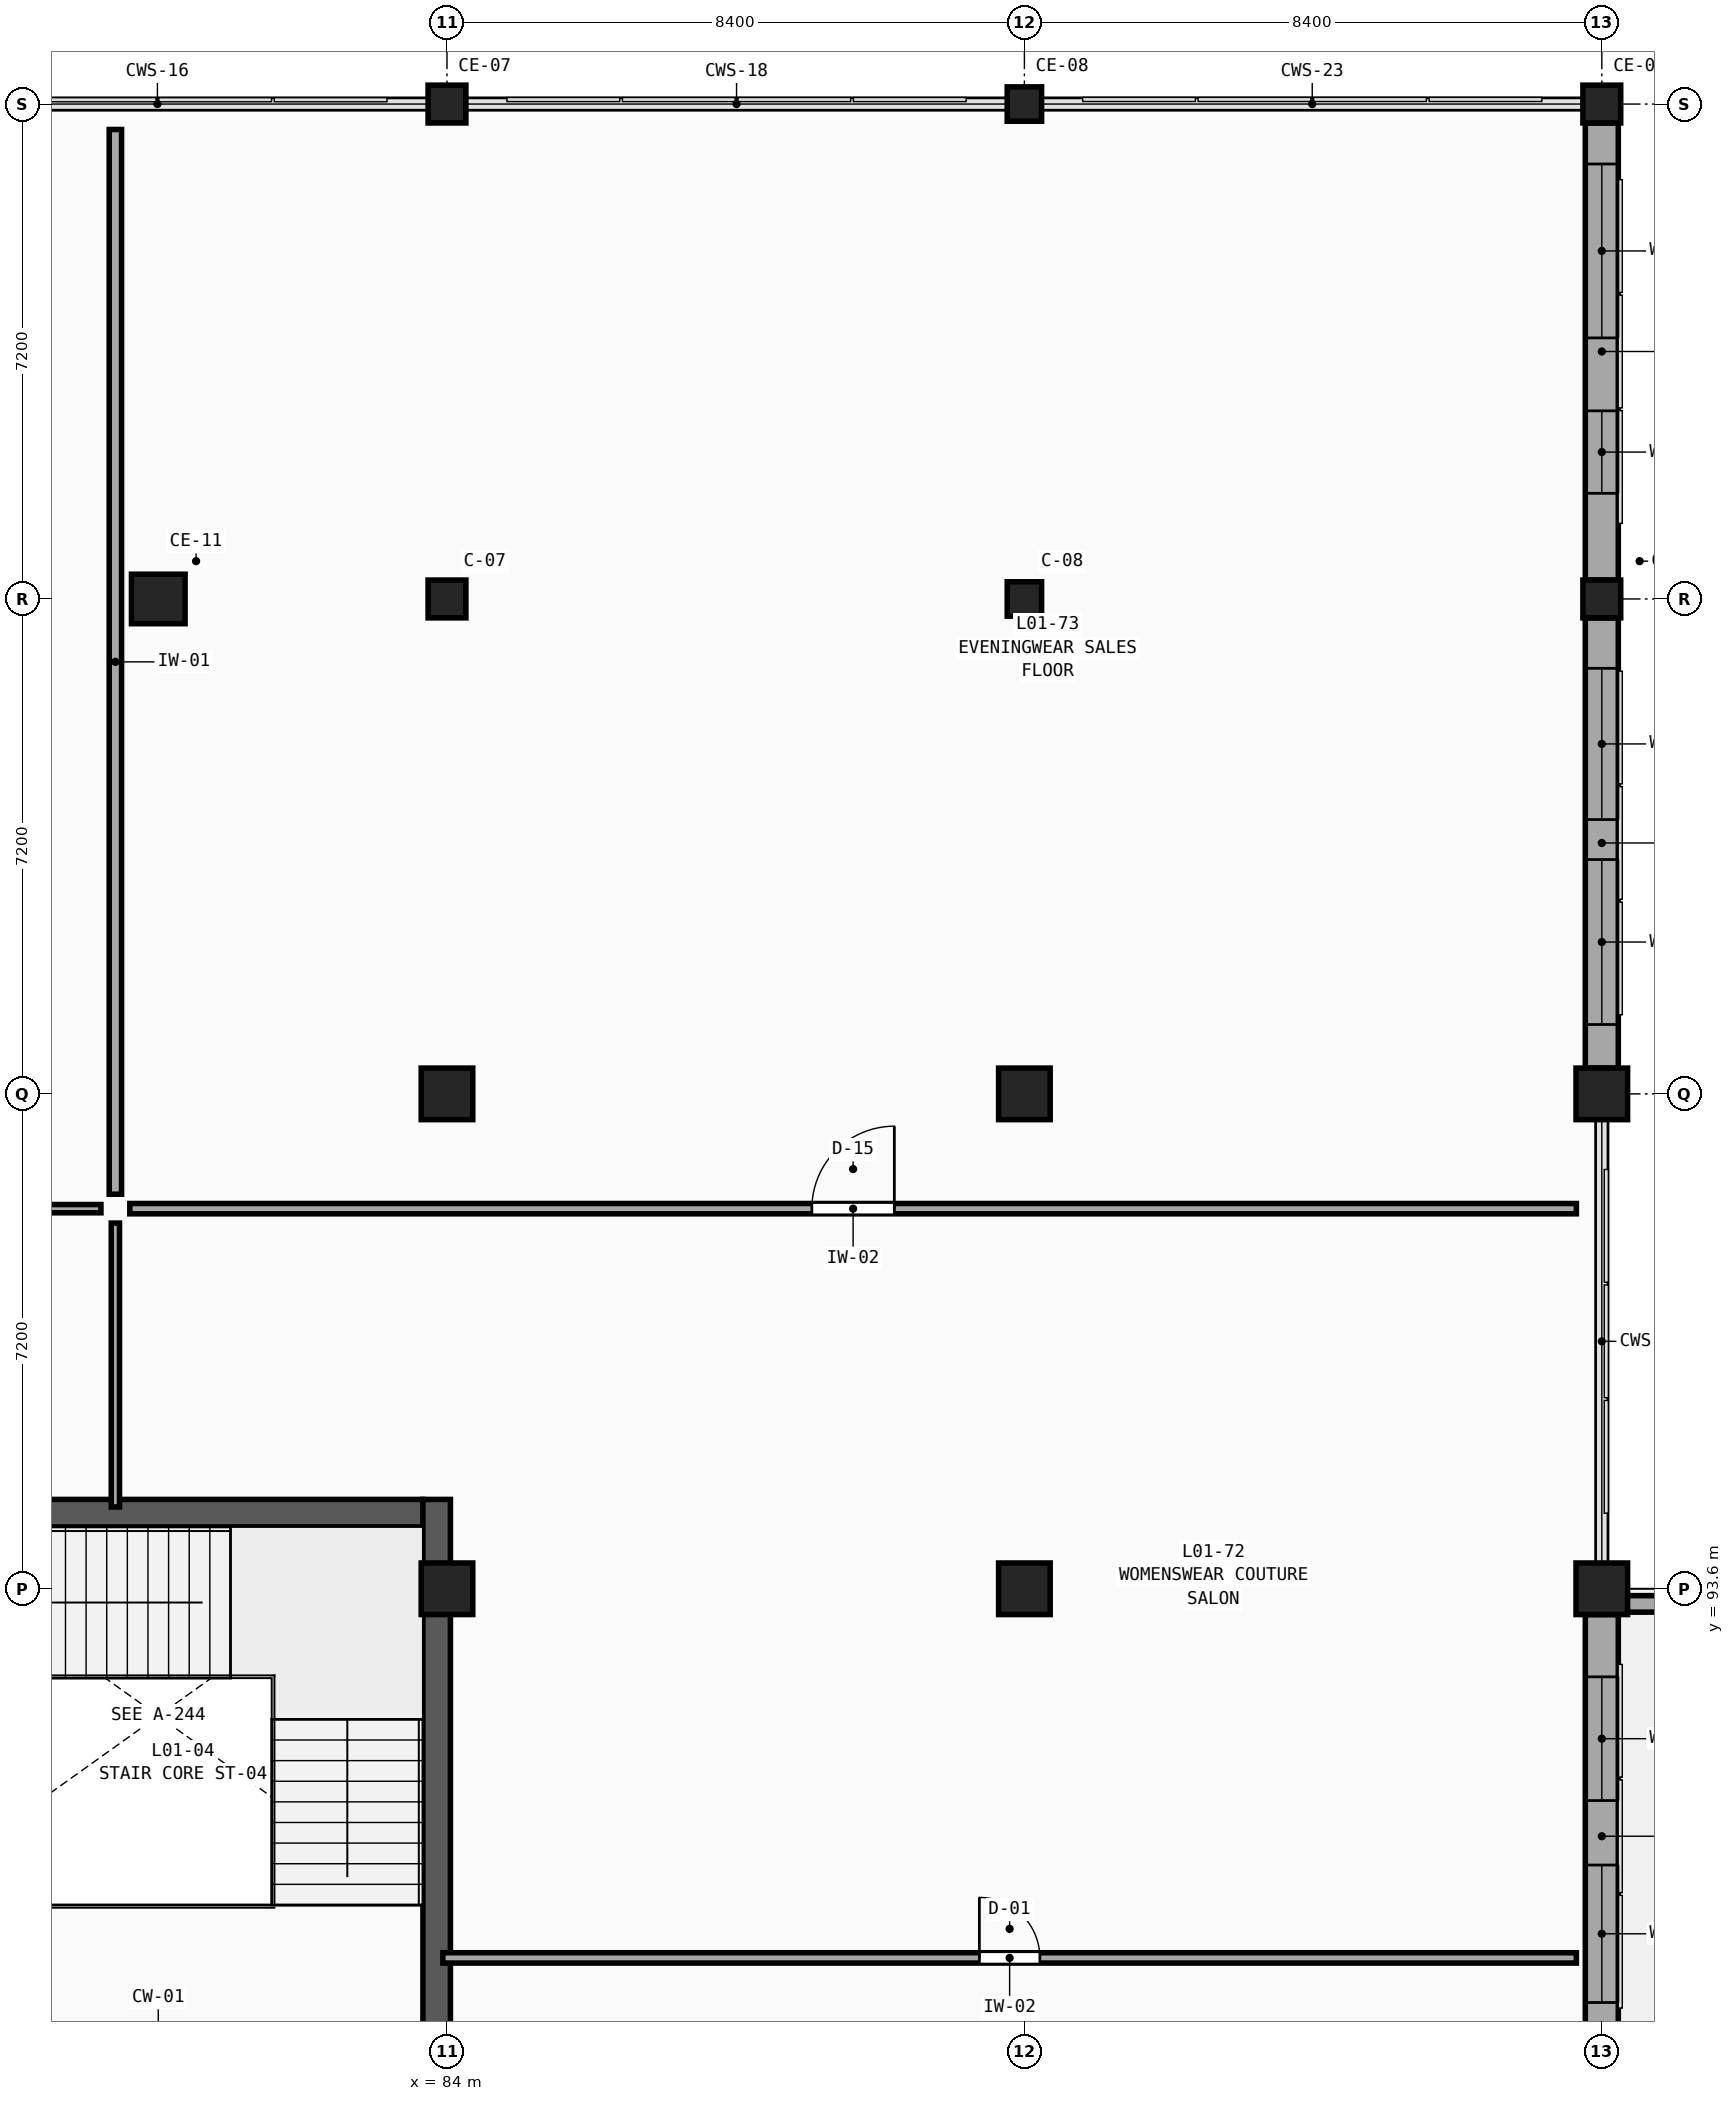
"""IFC4 building model, lengths in metres.
Left out: names, types, materials, properties, quantities, classifications, styles, units other than length and angle.
Written with IfcOpenShell. Run it as: python <this file> out.ifc"""

import sys

from ifc_helpers import new_model, si_unit, direction, frame, frame_2d, origin, origin_2d, place, context, subcontext, project, spatial, rectangle, extrude, element, fill, save


model = new_model("IFC4")
c1 = context("Model", 3, precision=1e-05, world=origin(), true_north=direction((0.0, 1.0)))
c2 = subcontext(c1, "Body", "Model", "MODEL_VIEW")
j1 = project(units=[si_unit("LENGTHUNIT", "METRE"), si_unit("PLANEANGLEUNIT", "RADIAN")], contexts=[c1])
p1 = place(None, origin())
s1 = spatial("IfcSite", under=j1, at=p1, CompositionType="ELEMENT")
p2 = place(p1, origin())
s2 = spatial("IfcBuilding", under=s1, at=p2, CompositionType="ELEMENT")
p3 = place(p2, frame((0.0, 0.0, 5.4)))
s3 = spatial("IfcBuildingStorey", under=s2, at=p3, CompositionType="ELEMENT", Elevation=5.4)
for number, where, z_axis, x_axis in (
    (1, (84.0, 93.6, 0.0), (0.0, 0.0, 1.0), (1.0, 0.0, 0.0)),
    (2, (84.0, 100.8, 0.0), (0.0, 0.0, 1.0), (1.0, 0.0, 0.0)),
):
    element("IfcColumn", number, at=place(p3, frame(where, z_axis=z_axis, x_axis=x_axis)), inside=s3, PredefinedType="COLUMN", context=c2, shape_type="SweptSolid", body=[
        extrude(rectangle(XDim=0.75, YDim=0.75, at=origin_2d()), origin(), (0.0, 0.0, 1.0), 4.5),
    ])
for number, where, z_axis, x_axis in (
    (3, (84.0, 108.0, 0.0), (0.0, 0.0, 1.0), (1.0, 0.0, 0.0)),
    (4, (84.0, 115.2, 0.0), (0.0, 0.0, 1.0), (1.0, 0.0, 0.0)),
):
    element("IfcColumn", number, at=place(p3, frame(where, z_axis=z_axis, x_axis=x_axis)), inside=s3, PredefinedType="COLUMN", context=c2, shape_type="SweptSolid", body=[
        extrude(rectangle(XDim=0.55, YDim=0.55, at=origin_2d()), origin(), (0.0, 0.0, 1.0), 4.5),
    ])
for number, where, z_axis, x_axis in (
    (5, (92.4, 93.6, 0.0), (0.0, 0.0, 1.0), (1.0, 0.0, 0.0)),
    (6, (92.4, 100.8, 0.0), (0.0, 0.0, 1.0), (1.0, 0.0, 0.0)),
):
    element("IfcColumn", number, at=place(p3, frame(where, z_axis=z_axis, x_axis=x_axis)), inside=s3, PredefinedType="COLUMN", context=c2, shape_type="SweptSolid", body=[
        extrude(rectangle(XDim=0.75, YDim=0.75, at=origin_2d()), origin(), (0.0, 0.0, 1.0), 4.5),
    ])
for number, where, z_axis, x_axis in (
    (7, (92.4, 108.0, 0.0), (0.0, 0.0, 1.0), (1.0, 0.0, 0.0)),
    (8, (92.4, 115.2, 0.0), (0.0, 0.0, 1.0), (1.0, 0.0, 0.0)),
):
    element("IfcColumn", number, at=place(p3, frame(where, z_axis=z_axis, x_axis=x_axis)), inside=s3, PredefinedType="COLUMN", context=c2, shape_type="SweptSolid", body=[
        extrude(rectangle(XDim=0.5, YDim=0.5, at=origin_2d()), origin(), (0.0, 0.0, 1.0), 4.5),
    ])
for number, where, z_axis, x_axis in (
    (9, (100.8, 93.6, 0.0), (0.0, 0.0, 1.0), (1.0, 0.0, 0.0)),
    (10, (100.8, 100.8, 0.0), (0.0, 0.0, 1.0), (1.0, 0.0, 0.0)),
):
    element("IfcColumn", number, at=place(p3, frame(where, z_axis=z_axis, x_axis=x_axis)), inside=s3, PredefinedType="COLUMN", context=c2, shape_type="SweptSolid", body=[
        extrude(rectangle(XDim=0.75, YDim=0.75, at=origin_2d()), origin(), (0.0, 0.0, 1.0), 4.5),
    ])
for number, where, z_axis, x_axis in (
    (11, (100.8, 108.0, 0.0), (0.0, 0.0, 1.0), (1.0, 0.0, 0.0)),
    (12, (100.8, 115.2, 0.0), (0.0, 0.0, 1.0), (1.0, 0.0, 0.0)),
):
    element("IfcColumn", number, at=place(p3, frame(where, z_axis=z_axis, x_axis=x_axis)), inside=s3, PredefinedType="COLUMN", context=c2, shape_type="SweptSolid", body=[
        extrude(rectangle(XDim=0.55, YDim=0.55, at=origin_2d()), origin(), (0.0, 0.0, 1.0), 4.5),
    ])
p4 = place(p3, frame((79.8, 108.0, 0.0), z_axis=(0.0, 0.0, 1.0), x_axis=(1.0, 0.0, 0.0)))
e13 = element("IfcColumn", 13, at=p4, inside=s3, PredefinedType="PILASTER", context=c2, shape_type="SweptSolid", body=[
    extrude(rectangle(XDim=0.78, YDim=0.72, at=origin_2d()), origin(), (0.0, 0.0, 1.0), 4.5),
])
p5 = place(p3, frame((100.8, 93.225, 0.0), z_axis=(0.0, 0.0, 1.0), x_axis=(0.0, -1.0, 0.0)))
e14 = element("IfcWall", 14, at=p5, inside=s3, PredefinedType="SOLIDWALL", context=c2, shape_type="SweptSolid", body=[
    extrude(rectangle(XDim=6.45, YDim=0.48, at=frame_2d((3.225, 0.0))), origin(), (0.0, 0.0, 1.0), 3.63),
])
p6 = place(p5, frame((0.906, 0.0, 0.75)))
e15 = element("IfcOpeningElement", 15, at=p6, cuts=e14, PredefinedType="OPENING", context=c2, shape_type="SweptSolid", body=[
    extrude(rectangle(XDim=1.8, YDim=2.73, at=frame_2d((0.9, 1.365))), frame((0.0, 0.26, 0.0), z_axis=(0.0, -1.0, 0.0), x_axis=(1.0, 0.0, 0.0)), (0.0, 0.0, 1.0), 0.52),
])
p7 = place(p5, frame((3.644, 0.0, 0.75)))
e16 = element("IfcOpeningElement", 16, at=p7, cuts=e14, PredefinedType="OPENING", context=c2, shape_type="SweptSolid", body=[
    extrude(rectangle(XDim=2.0, YDim=2.73, at=frame_2d((1.0, 1.365))), frame((0.0, 0.26, 0.0), z_axis=(0.0, -1.0, 0.0), x_axis=(1.0, 0.0, 0.0)), (0.0, 0.0, 1.0), 0.52),
])
p8 = place(p3, frame((100.8, 107.725, 0.0), z_axis=(0.0, 0.0, 1.0), x_axis=(0.0, -1.0, 0.0)))
e17 = element("IfcWall", 17, at=p8, inside=s3, PredefinedType="SOLIDWALL", context=c2, shape_type="SweptSolid", body=[
    extrude(rectangle(XDim=6.55, YDim=0.48, at=frame_2d((3.275, 0.0))), origin(), (0.0, 0.0, 1.0), 3.63),
])
p9 = place(p8, frame((0.734, 0.0, 0.75)))
e18 = element("IfcOpeningElement", 18, at=p9, cuts=e17, PredefinedType="OPENING", context=c2, shape_type="SweptSolid", body=[
    extrude(rectangle(XDim=2.2, YDim=2.73, at=frame_2d((1.1, 1.365))), frame((0.0, 0.26, 0.0), z_axis=(0.0, -1.0, 0.0), x_axis=(1.0, 0.0, 0.0)), (0.0, 0.0, 1.0), 0.52),
])
p10 = place(p8, frame((3.516, 0.0, 0.75)))
e19 = element("IfcOpeningElement", 19, at=p10, cuts=e17, PredefinedType="OPENING", context=c2, shape_type="SweptSolid", body=[
    extrude(rectangle(XDim=2.4, YDim=2.73, at=frame_2d((1.2, 1.365))), frame((0.0, 0.26, 0.0), z_axis=(0.0, -1.0, 0.0), x_axis=(1.0, 0.0, 0.0)), (0.0, 0.0, 1.0), 0.52),
])
p11 = place(p3, frame((100.8, 114.925, 0.0), z_axis=(0.0, 0.0, 1.0), x_axis=(0.0, -1.0, 0.0)))
e20 = element("IfcWall", 20, at=p11, inside=s3, PredefinedType="SOLIDWALL", context=c2, shape_type="SweptSolid", body=[
    extrude(rectangle(XDim=6.65, YDim=0.48, at=frame_2d((3.325, 0.0))), origin(), (0.0, 0.0, 1.0), 3.63),
])
p12 = place(p11, frame((0.597, 0.0, 0.75)))
e21 = element("IfcOpeningElement", 21, at=p12, cuts=e20, PredefinedType="OPENING", context=c2, shape_type="SweptSolid", body=[
    extrude(rectangle(XDim=2.53, YDim=2.73, at=frame_2d((1.265, 1.365))), frame((0.0, 0.26, 0.0), z_axis=(0.0, -1.0, 0.0), x_axis=(1.0, 0.0, 0.0)), (0.0, 0.0, 1.0), 0.52),
])
p13 = place(p11, frame((4.188, 0.0, 0.75)))
e22 = element("IfcOpeningElement", 22, at=p13, cuts=e20, PredefinedType="OPENING", context=c2, shape_type="SweptSolid", body=[
    extrude(rectangle(XDim=1.2, YDim=1.9, at=frame_2d((0.6, 0.95))), frame((0.0, 0.26, 0.0), z_axis=(0.0, -1.0, 0.0), x_axis=(1.0, 0.0, 0.0)), (0.0, 0.0, 1.0), 0.52),
])
p14 = place(p3, frame((101.15, 93.38, 0.0), z_axis=(0.0, 0.0, 1.0), x_axis=(1.0, 0.0, 0.0)))
e23 = element("IfcWall", 23, at=p14, inside=s3, PredefinedType="PARAPET", context=c2, shape_type="SweptSolid", body=[
    extrude(rectangle(XDim=16.1, YDim=0.24, at=frame_2d((8.05, 0.0))), origin(), (0.0, 0.0, 1.0), 1.15),
])
p15 = place(p3, frame((75.95, 94.7, 0.0), z_axis=(0.0, 0.0, 1.0), x_axis=(1.0, 0.0, 0.0)))
e24 = element("IfcWall", 24, at=p15, inside=s3, PredefinedType="SHEAR", context=c2, shape_type="SweptSolid", body=[
    extrude(rectangle(XDim=7.7, YDim=0.4, at=frame_2d((3.85, 0.0))), origin(), (0.0, 0.0, 1.0), 4.5),
])
p16 = place(p3, frame((83.85, 86.45, 0.0), z_axis=(0.0, 0.0, 1.0), x_axis=(0.0, 1.0, 0.0)))
e25 = element("IfcWall", 25, at=p16, inside=s3, PredefinedType="SHEAR", context=c2, shape_type="SweptSolid", body=[
    extrude(rectangle(XDim=8.45, YDim=0.4, at=frame_2d((4.225, 0.0))), origin(), (0.0, 0.0, 1.0), 4.5),
])
p17 = place(p3, frame((79.386, 99.13, 0.0), z_axis=(0.0, 0.0, 1.0), x_axis=(1.0, 0.0, 0.0)))
e26 = element("IfcWall", 26, at=p17, inside=s3, PredefinedType="PARTITIONING", context=c2, shape_type="SweptSolid", body=[
    extrude(rectangle(XDim=21.044, YDim=0.15, at=frame_2d((10.522, 0.0))), origin(), (0.0, 0.0, 1.0), 4.18),
])
p18 = place(p17, frame((9.922, 0.0, 0.0)))
e27 = element("IfcOpeningElement", 27, at=p18, cuts=e26, PredefinedType="OPENING", context=c2, shape_type="SweptSolid", body=[
    extrude(rectangle(XDim=1.2, YDim=2.21, at=frame_2d((0.6, 1.105))), frame((0.0, 0.095, 0.0), z_axis=(0.0, -1.0, 0.0), x_axis=(1.0, 0.0, 0.0)), (0.0, 0.0, 1.0), 0.19),
])
p19 = place(p3, frame((62.122, 99.13, 0.0), z_axis=(0.0, 0.0, 1.0), x_axis=(1.0, 0.0, 0.0)))
e28 = element("IfcWall", 28, at=p19, inside=s3, PredefinedType="PARTITIONING", context=c2, shape_type="SweptSolid", body=[
    extrude(rectangle(XDim=16.844, YDim=0.12, at=frame_2d((8.422, 0.0))), origin(), (0.0, 0.0, 1.0), 4.18),
])
p20 = place(p19, frame((7.742, 0.0, 0.0)))
e29 = element("IfcOpeningElement", 29, at=p20, cuts=e28, PredefinedType="OPENING", context=c2, shape_type="SweptSolid", body=[
    extrude(rectangle(XDim=1.36, YDim=2.21, at=frame_2d((0.68, 1.105))), frame((0.0, 0.08, 0.0), z_axis=(0.0, -1.0, 0.0), x_axis=(1.0, 0.0, 0.0)), (0.0, 0.0, 1.0), 0.16),
])
p21 = place(p3, frame((83.94, 88.23, 0.0), z_axis=(0.0, 0.0, 1.0), x_axis=(1.0, 0.0, 0.0)))
e30 = element("IfcWall", 30, at=p21, inside=s3, PredefinedType="PARTITIONING", context=c2, shape_type="SweptSolid", body=[
    extrude(rectangle(XDim=16.49, YDim=0.15, at=frame_2d((8.245, 0.0))), origin(), (0.0, 0.0, 1.0), 4.18),
])
p22 = place(p21, frame((7.805, 0.0, 0.0)))
e31 = element("IfcOpeningElement", 31, at=p22, cuts=e30, PredefinedType="OPENING", context=c2, shape_type="SweptSolid", body=[
    extrude(rectangle(XDim=0.88, YDim=2.05, at=frame_2d((0.44, 1.025))), frame((0.0, 0.095, 0.0), z_axis=(0.0, -1.0, 0.0), x_axis=(1.0, 0.0, 0.0)), (0.0, 0.0, 1.0), 0.19),
])
p23 = place(p3, frame((79.176, 99.34, 0.0), z_axis=(0.0, 0.0, 1.0), x_axis=(0.0, 1.0, 0.0)))
e32 = element("IfcWall", 32, at=p23, inside=s3, PredefinedType="PARTITIONING", context=c2, shape_type="SweptSolid", body=[
    extrude(rectangle(XDim=15.49, YDim=0.18, at=frame_2d((7.745, 0.0))), origin(), (0.0, 0.0, 1.0), 4.18),
])
p24 = place(p3, frame((79.176, 94.79, 0.0), z_axis=(0.0, 0.0, 1.0), x_axis=(0.0, 1.0, 0.0)))
e33 = element("IfcWall", 33, at=p24, inside=s3, PredefinedType="PARTITIONING", context=c2, shape_type="SweptSolid", body=[
    extrude(rectangle(XDim=4.13, YDim=0.12, at=frame_2d((2.065, 0.0))), origin(), (0.0, 0.0, 1.0), 4.18),
])
p25 = place(p6, origin())
e34 = element("IfcWindow", 34, at=p25, inside=s3, PartitioningType="DOUBLE_PANEL_VERTICAL", PredefinedType="WINDOW", context=c2, shape_type="SweptSolid", body=[
    extrude(rectangle(XDim=1.8, YDim=2.73, at=frame_2d((0.9, 1.365))), frame((0.0, 0.03, 0.0), z_axis=(0.0, -1.0, 0.0), x_axis=(1.0, 0.0, 0.0)), (0.0, 0.0, 1.0), 0.06),
])
fill(e15, e34)
p26 = place(p7, origin())
e35 = element("IfcWindow", 35, at=p26, inside=s3, PartitioningType="TRIPLE_PANEL_VERTICAL", PredefinedType="WINDOW", context=c2, shape_type="SweptSolid", body=[
    extrude(rectangle(XDim=2.0, YDim=2.73, at=frame_2d((1.0, 1.365))), frame((0.0, 0.03, 0.0), z_axis=(0.0, -1.0, 0.0), x_axis=(1.0, 0.0, 0.0)), (0.0, 0.0, 1.0), 0.06),
])
fill(e16, e35)
p27 = place(p9, origin())
e36 = element("IfcWindow", 36, at=p27, inside=s3, PartitioningType="TRIPLE_PANEL_VERTICAL", PredefinedType="WINDOW", context=c2, shape_type="SweptSolid", body=[
    extrude(rectangle(XDim=2.2, YDim=2.73, at=frame_2d((1.1, 1.365))), frame((0.0, 0.03, 0.0), z_axis=(0.0, -1.0, 0.0), x_axis=(1.0, 0.0, 0.0)), (0.0, 0.0, 1.0), 0.06),
])
fill(e18, e36)
p28 = place(p10, origin())
e37 = element("IfcWindow", 37, at=p28, inside=s3, PartitioningType="TRIPLE_PANEL_VERTICAL", PredefinedType="WINDOW", context=c2, shape_type="SweptSolid", body=[
    extrude(rectangle(XDim=2.4, YDim=2.73, at=frame_2d((1.2, 1.365))), frame((0.0, 0.03, 0.0), z_axis=(0.0, -1.0, 0.0), x_axis=(1.0, 0.0, 0.0)), (0.0, 0.0, 1.0), 0.06),
])
fill(e19, e37)
p29 = place(p12, origin())
e38 = element("IfcWindow", 38, at=p29, inside=s3, PartitioningType="TRIPLE_PANEL_VERTICAL", PredefinedType="WINDOW", context=c2, shape_type="SweptSolid", body=[
    extrude(rectangle(XDim=2.53, YDim=2.73, at=frame_2d((1.265, 1.365))), frame((0.0, 0.03, 0.0), z_axis=(0.0, -1.0, 0.0), x_axis=(1.0, 0.0, 0.0)), (0.0, 0.0, 1.0), 0.06),
])
fill(e21, e38)
p30 = place(p13, origin())
e39 = element("IfcWindow", 39, at=p30, inside=s3, PartitioningType="SINGLE_PANEL", PredefinedType="WINDOW", context=c2, shape_type="SweptSolid", body=[
    extrude(rectangle(XDim=1.2, YDim=1.9, at=frame_2d((0.6, 0.95))), frame((0.0, 0.03, 0.0), z_axis=(0.0, -1.0, 0.0), x_axis=(1.0, 0.0, 0.0)), (0.0, 0.0, 1.0), 0.06),
])
fill(e22, e39)
p31 = place(p18, origin())
e40 = element("IfcDoor", 40, at=p31, inside=s3, OperationType="SINGLE_SWING_RIGHT", PredefinedType="DOOR", context=c2, shape_type="SweptSolid", body=[
    extrude(rectangle(XDim=1.2, YDim=2.21, at=frame_2d((0.6, 1.105))), frame((0.0, 0.025, 0.0), z_axis=(0.0, -1.0, 0.0), x_axis=(1.0, 0.0, 0.0)), (0.0, 0.0, 1.0), 0.05),
])
fill(e27, e40)
p32 = place(p22, origin())
e41 = element("IfcDoor", 41, at=p32, inside=s3, OperationType="SINGLE_SWING_LEFT", PredefinedType="DOOR", context=c2, shape_type="SweptSolid", body=[
    extrude(rectangle(XDim=0.88, YDim=2.05, at=frame_2d((0.44, 1.025))), frame((0.0, 0.025, 0.0), z_axis=(0.0, -1.0, 0.0), x_axis=(1.0, 0.0, 0.0)), (0.0, 0.0, 1.0), 0.05),
])
fill(e31, e41)
save(model, sys.argv[1])
